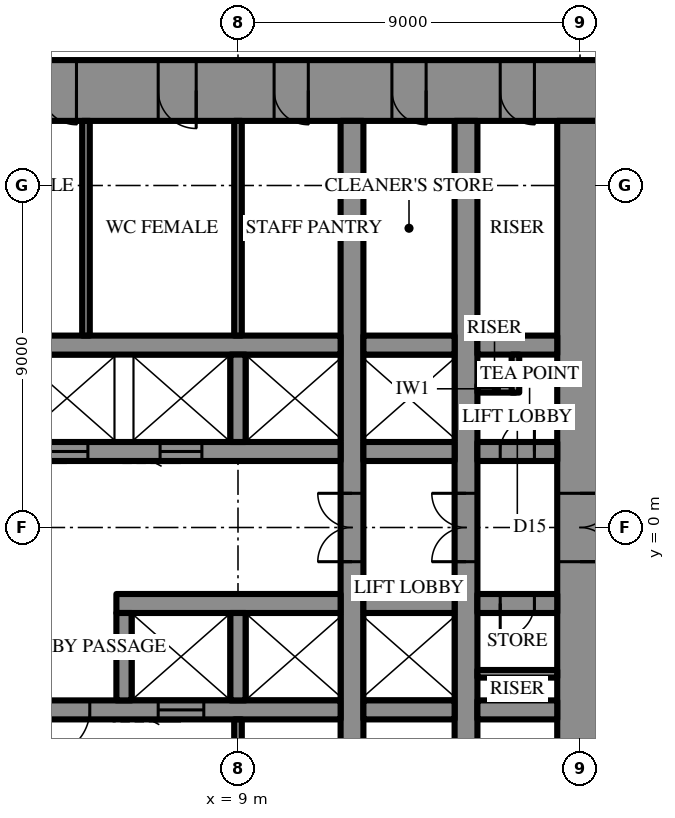
"""IFC4 building model, lengths in metres.
Left out: names, types, materials, properties, quantities, classifications, styles, units other than length and angle.
Written with IfcOpenShell. Run it as: python <this file> out.ifc"""

import sys

from ifc_helpers import new_model, si_unit, direction, frame, frame_2d, origin, place, context, subcontext, project, spatial, rectangle, extrude, element, fill, save


model = new_model("IFC4")
c1 = context("Model", 3, precision=1e-05, world=origin(), true_north=direction((0.0, 1.0)))
c2 = subcontext(c1, "Body", "Model", "MODEL_VIEW")
j1 = project(units=[si_unit("LENGTHUNIT", "METRE"), si_unit("PLANEANGLEUNIT", "RADIAN")], contexts=[c1])
p1 = place(None, origin())
s1 = spatial("IfcSite", under=j1, at=p1, CompositionType="ELEMENT")
p2 = place(p1, origin())
s2 = spatial("IfcBuilding", under=s1, at=p2, CompositionType="ELEMENT")
p3 = place(p2, frame((0.0, 0.0, 165.7)))
s3 = spatial("IfcBuildingStorey", under=s2, at=p3, CompositionType="ELEMENT", Elevation=165.7)
p4 = place(p3, frame((-18.6, 11.5, 0.0), z_axis=(0.0, 0.0, 1.0), x_axis=(1.0, 0.0, 0.0)))
e1 = element("IfcWall", 1, at=p4, inside=s3, PredefinedType="SHEAR", context=c2, shape_type="SweptSolid", body=[
    extrude(rectangle(XDim=37.2, YDim=1.6, at=frame_2d((18.6, 0.0))), origin(), (0.0, 0.0, 1.0), 4.2),
])
p5 = place(p4, frame((19.45, 0.0, 0.0)))
e2 = element("IfcOpeningElement", 2, at=p5, cuts=e1, PredefinedType="OPENING", context=c2, shape_type="SweptSolid", body=[
    extrude(rectangle(XDim=0.9, YDim=2.2, at=frame_2d((0.45, 1.1))), frame((0.0, 0.81, 0.0), z_axis=(0.0, -1.0, 0.0), x_axis=(1.0, 0.0, 0.0)), (0.0, 0.0, 1.0), 1.62),
])
p6 = place(p4, frame((22.45, 0.0, 0.0)))
e3 = element("IfcOpeningElement", 3, at=p6, cuts=e1, PredefinedType="OPENING", context=c2, shape_type="SweptSolid", body=[
    extrude(rectangle(XDim=0.9, YDim=2.2, at=frame_2d((0.45, 1.1))), frame((0.0, 0.81, 0.0), z_axis=(0.0, -1.0, 0.0), x_axis=(1.0, 0.0, 0.0)), (0.0, 0.0, 1.0), 1.62),
])
p7 = place(p4, frame((25.5, 0.0, 0.0)))
e4 = element("IfcOpeningElement", 4, at=p7, cuts=e1, PredefinedType="OPENING", context=c2, shape_type="SweptSolid", body=[
    extrude(rectangle(XDim=1.0, YDim=2.2, at=frame_2d((0.5, 1.1))), frame((0.0, 0.81, 0.0), z_axis=(0.0, -1.0, 0.0), x_axis=(1.0, 0.0, 0.0)), (0.0, 0.0, 1.0), 1.62),
])
p8 = place(p4, frame((1.8, 0.0, 0.0)))
e5 = element("IfcOpeningElement", 5, at=p8, cuts=e1, PredefinedType="OPENING", context=c2, shape_type="SweptSolid", body=[
    extrude(rectangle(XDim=0.9, YDim=2.2, at=frame_2d((0.45, 1.1))), frame((0.0, 0.81, 0.0), z_axis=(0.0, -1.0, 0.0), x_axis=(1.0, 0.0, 0.0)), (0.0, 0.0, 1.0), 1.62),
])
p9 = place(p4, frame((4.65, 0.0, 0.0)))
e6 = element("IfcOpeningElement", 6, at=p9, cuts=e1, PredefinedType="OPENING", context=c2, shape_type="SweptSolid", body=[
    extrude(rectangle(XDim=0.9, YDim=2.2, at=frame_2d((0.45, 1.1))), frame((0.0, 0.81, 0.0), z_axis=(0.0, -1.0, 0.0), x_axis=(1.0, 0.0, 0.0)), (0.0, 0.0, 1.0), 1.62),
])
p10 = place(p4, frame((7.75, 0.0, 0.0)))
e7 = element("IfcOpeningElement", 7, at=p10, cuts=e1, PredefinedType="OPENING", context=c2, shape_type="SweptSolid", body=[
    extrude(rectangle(XDim=0.9, YDim=2.2, at=frame_2d((0.45, 1.1))), frame((0.0, 0.81, 0.0), z_axis=(0.0, -1.0, 0.0), x_axis=(1.0, 0.0, 0.0)), (0.0, 0.0, 1.0), 1.62),
])
p11 = place(p4, frame((28.55, 0.0, 0.0)))
e8 = element("IfcOpeningElement", 8, at=p11, cuts=e1, PredefinedType="OPENING", context=c2, shape_type="SweptSolid", body=[
    extrude(rectangle(XDim=0.9, YDim=2.2, at=frame_2d((0.45, 1.1))), frame((0.0, 0.81, 0.0), z_axis=(0.0, -1.0, 0.0), x_axis=(1.0, 0.0, 0.0)), (0.0, 0.0, 1.0), 1.62),
])
p12 = place(p4, frame((31.65, 0.0, 0.0)))
e9 = element("IfcOpeningElement", 9, at=p12, cuts=e1, PredefinedType="OPENING", context=c2, shape_type="SweptSolid", body=[
    extrude(rectangle(XDim=0.9, YDim=2.2, at=frame_2d((0.45, 1.1))), frame((0.0, 0.81, 0.0), z_axis=(0.0, -1.0, 0.0), x_axis=(1.0, 0.0, 0.0)), (0.0, 0.0, 1.0), 1.62),
])
p13 = place(p4, frame((34.5, 0.0, 0.0)))
e10 = element("IfcOpeningElement", 10, at=p13, cuts=e1, PredefinedType="OPENING", context=c2, shape_type="SweptSolid", body=[
    extrude(rectangle(XDim=0.9, YDim=2.2, at=frame_2d((0.45, 1.1))), frame((0.0, 0.81, 0.0), z_axis=(0.0, -1.0, 0.0), x_axis=(1.0, 0.0, 0.0)), (0.0, 0.0, 1.0), 1.62),
])
p14 = place(p3, frame((18.0, -10.7, 0.0), z_axis=(0.0, 0.0, 1.0), x_axis=(0.0, 1.0, 0.0)))
e11 = element("IfcWall", 11, at=p14, inside=s3, PredefinedType="SHEAR", context=c2, shape_type="SweptSolid", body=[
    extrude(rectangle(XDim=21.4, YDim=1.2, at=frame_2d((10.7, 0.0))), origin(), (0.0, 0.0, 1.0), 4.2),
])
p15 = place(p14, frame((9.8, 0.0, 0.0)))
e12 = element("IfcOpeningElement", 12, at=p15, cuts=e11, PredefinedType="OPENING", context=c2, shape_type="SweptSolid", body=[
    extrude(rectangle(XDim=1.8, YDim=2.4, at=frame_2d((0.9, 1.2))), frame((0.0, 0.61, 0.0), z_axis=(0.0, -1.0, 0.0), x_axis=(1.0, 0.0, 0.0)), (0.0, 0.0, 1.0), 1.22),
])
p16 = place(p3, frame((12.0, -10.7, 0.0), z_axis=(0.0, 0.0, 1.0), x_axis=(0.0, 1.0, 0.0)))
e13 = element("IfcWall", 13, at=p16, inside=s3, PredefinedType="SHEAR", context=c2, shape_type="SweptSolid", body=[
    extrude(rectangle(XDim=21.4, YDim=0.6, at=frame_2d((10.7, 0.0))), origin(), (0.0, 0.0, 1.0), 4.2),
])
p17 = place(p16, frame((9.8, 0.0, 0.0)))
e14 = element("IfcOpeningElement", 14, at=p17, cuts=e13, PredefinedType="OPENING", context=c2, shape_type="SweptSolid", body=[
    extrude(rectangle(XDim=1.8, YDim=2.4, at=frame_2d((0.9, 1.2))), frame((0.0, 0.31, 0.0), z_axis=(0.0, -1.0, 0.0), x_axis=(1.0, 0.0, 0.0)), (0.0, 0.0, 1.0), 0.62),
])
p18 = place(p3, frame((15.0, -10.7, 0.0), z_axis=(0.0, 0.0, 1.0), x_axis=(0.0, 1.0, 0.0)))
e15 = element("IfcWall", 15, at=p18, inside=s3, PredefinedType="SHEAR", context=c2, shape_type="SweptSolid", body=[
    extrude(rectangle(XDim=21.4, YDim=0.6, at=frame_2d((10.7, 0.0))), origin(), (0.0, 0.0, 1.0), 4.2),
])
p19 = place(p18, frame((9.8, 0.0, 0.0)))
e16 = element("IfcOpeningElement", 16, at=p19, cuts=e15, PredefinedType="OPENING", context=c2, shape_type="SweptSolid", body=[
    extrude(rectangle(XDim=1.8, YDim=2.4, at=frame_2d((0.9, 1.2))), frame((0.0, 0.31, 0.0), z_axis=(0.0, -1.0, 0.0), x_axis=(1.0, 0.0, 0.0)), (0.0, 0.0, 1.0), 0.62),
])
p20 = place(p3, frame((-3.2, 2.0, 0.0), z_axis=(0.0, 0.0, 1.0), x_axis=(1.0, 0.0, 0.0)))
e17 = element("IfcWall", 17, at=p20, inside=s3, PredefinedType="SHEAR", context=c2, shape_type="SweptSolid", body=[
    extrude(rectangle(XDim=14.9, YDim=0.5, at=frame_2d((7.45, 0.0))), origin(), (0.0, 0.0, 1.0), 4.2),
])
p21 = place(p20, frame((1.15, 0.0, 0.0)))
e18 = element("IfcOpeningElement", 18, at=p21, cuts=e17, PredefinedType="OPENING", context=c2, shape_type="SweptSolid", body=[
    extrude(rectangle(XDim=1.1, YDim=2.2, at=frame_2d((0.55, 1.1))), frame((0.0, 0.26, 0.0), z_axis=(0.0, -1.0, 0.0), x_axis=(1.0, 0.0, 0.0)), (0.0, 0.0, 1.0), 0.52),
])
p22 = place(p20, frame((4.15, 0.0, 0.0)))
e19 = element("IfcOpeningElement", 19, at=p22, cuts=e17, PredefinedType="OPENING", context=c2, shape_type="SweptSolid", body=[
    extrude(rectangle(XDim=1.1, YDim=2.2, at=frame_2d((0.55, 1.1))), frame((0.0, 0.26, 0.0), z_axis=(0.0, -1.0, 0.0), x_axis=(1.0, 0.0, 0.0)), (0.0, 0.0, 1.0), 0.52),
])
p23 = place(p20, frame((7.15, 0.0, 0.0)))
e20 = element("IfcOpeningElement", 20, at=p23, cuts=e17, PredefinedType="OPENING", context=c2, shape_type="SweptSolid", body=[
    extrude(rectangle(XDim=1.1, YDim=2.2, at=frame_2d((0.55, 1.1))), frame((0.0, 0.26, 0.0), z_axis=(0.0, -1.0, 0.0), x_axis=(1.0, 0.0, 0.0)), (0.0, 0.0, 1.0), 0.52),
])
p24 = place(p20, frame((10.15, 0.0, 0.0)))
e21 = element("IfcOpeningElement", 21, at=p24, cuts=e17, PredefinedType="OPENING", context=c2, shape_type="SweptSolid", body=[
    extrude(rectangle(XDim=1.1, YDim=2.2, at=frame_2d((0.55, 1.1))), frame((0.0, 0.26, 0.0), z_axis=(0.0, -1.0, 0.0), x_axis=(1.0, 0.0, 0.0)), (0.0, 0.0, 1.0), 0.52),
])
p25 = place(p3, frame((12.3, 2.0, 0.0), z_axis=(0.0, 0.0, 1.0), x_axis=(1.0, 0.0, 0.0)))
e22 = element("IfcWall", 22, at=p25, inside=s3, PredefinedType="SHEAR", context=c2, shape_type="SweptSolid", body=[
    extrude(rectangle(XDim=2.4, YDim=0.5, at=frame_2d((1.2, 0.0))), origin(), (0.0, 0.0, 1.0), 4.2),
])
p26 = place(p3, frame((15.3, 2.0, 0.0), z_axis=(0.0, 0.0, 1.0), x_axis=(1.0, 0.0, 0.0)))
e23 = element("IfcWall", 23, at=p26, inside=s3, PredefinedType="SHEAR", context=c2, shape_type="SweptSolid", body=[
    extrude(rectangle(XDim=2.1, YDim=0.5, at=frame_2d((1.05, 0.0))), origin(), (0.0, 0.0, 1.0), 4.2),
])
p27 = place(p26, frame((0.6, 0.0, 0.0)))
e24 = element("IfcOpeningElement", 24, at=p27, cuts=e23, PredefinedType="OPENING", context=c2, shape_type="SweptSolid", body=[
    extrude(rectangle(XDim=0.9, YDim=2.2, at=frame_2d((0.45, 1.1))), frame((0.0, 0.26, 0.0), z_axis=(0.0, -1.0, 0.0), x_axis=(1.0, 0.0, 0.0)), (0.0, 0.0, 1.0), 0.52),
])
p28 = place(p3, frame((-11.7, 4.8, 0.0), z_axis=(0.0, 0.0, 1.0), x_axis=(1.0, 0.0, 0.0)))
e25 = element("IfcWall", 25, at=p28, inside=s3, PredefinedType="SHEAR", context=c2, shape_type="SweptSolid", body=[
    extrude(rectangle(XDim=23.4, YDim=0.5, at=frame_2d((11.7, 0.0))), origin(), (0.0, 0.0, 1.0), 4.2),
])
p29 = place(p28, frame((6.6, 0.0, 0.0)))
e26 = element("IfcOpeningElement", 26, at=p29, cuts=e25, PredefinedType="OPENING", context=c2, shape_type="SweptSolid", body=[
    extrude(rectangle(XDim=1.2, YDim=2.2, at=frame_2d((0.6, 1.1))), frame((0.0, 0.26, 0.0), z_axis=(0.0, -1.0, 0.0), x_axis=(1.0, 0.0, 0.0)), (0.0, 0.0, 1.0), 0.52),
])
p30 = place(p28, frame((3.6, 0.0, 0.0)))
e27 = element("IfcOpeningElement", 27, at=p30, cuts=e25, PredefinedType="OPENING", context=c2, shape_type="SweptSolid", body=[
    extrude(rectangle(XDim=1.2, YDim=2.2, at=frame_2d((0.6, 1.1))), frame((0.0, 0.26, 0.0), z_axis=(0.0, -1.0, 0.0), x_axis=(1.0, 0.0, 0.0)), (0.0, 0.0, 1.0), 0.52),
])
p31 = place(p3, frame((12.3, 4.8, 0.0), z_axis=(0.0, 0.0, 1.0), x_axis=(1.0, 0.0, 0.0)))
e28 = element("IfcWall", 28, at=p31, inside=s3, PredefinedType="SHEAR", context=c2, shape_type="SweptSolid", body=[
    extrude(rectangle(XDim=2.4, YDim=0.5, at=frame_2d((1.2, 0.0))), origin(), (0.0, 0.0, 1.0), 4.2),
])
p32 = place(p3, frame((15.3, 4.8, 0.0), z_axis=(0.0, 0.0, 1.0), x_axis=(1.0, 0.0, 0.0)))
e29 = element("IfcWall", 29, at=p32, inside=s3, PredefinedType="SHEAR", context=c2, shape_type="SweptSolid", body=[
    extrude(rectangle(XDim=2.1, YDim=0.5, at=frame_2d((1.05, 0.0))), origin(), (0.0, 0.0, 1.0), 4.2),
])
p33 = place(p3, frame((9.0, 2.25, 0.0), z_axis=(0.0, 0.0, 1.0), x_axis=(0.0, 1.0, 0.0)))
e30 = element("IfcWall", 30, at=p33, inside=s3, PredefinedType="SHEAR", context=c2, shape_type="SweptSolid", body=[
    extrude(rectangle(XDim=2.3, YDim=0.4, at=frame_2d((1.15, 0.0))), origin(), (0.0, 0.0, 1.0), 4.2),
])
p34 = place(p3, frame((17.4, -2.0, 0.0), z_axis=(0.0, 0.0, 1.0), x_axis=(-1.0, 0.0, 0.0)))
e31 = element("IfcWall", 31, at=p34, inside=s3, PredefinedType="SHEAR", context=c2, shape_type="SweptSolid", body=[
    extrude(rectangle(XDim=2.1, YDim=0.5, at=frame_2d((1.05, 0.0))), origin(), (0.0, 0.0, 1.0), 4.2),
])
p35 = place(p34, frame((0.6, 0.0, 0.0)))
e32 = element("IfcOpeningElement", 32, at=p35, cuts=e31, PredefinedType="OPENING", context=c2, shape_type="SweptSolid", body=[
    extrude(rectangle(XDim=0.9, YDim=2.2, at=frame_2d((0.45, 1.1))), frame((0.0, 0.26, 0.0), z_axis=(0.0, -1.0, 0.0), x_axis=(1.0, 0.0, 0.0)), (0.0, 0.0, 1.0), 0.52),
])
p36 = place(p3, frame((14.7, -2.0, 0.0), z_axis=(0.0, 0.0, 1.0), x_axis=(-1.0, 0.0, 0.0)))
e33 = element("IfcWall", 33, at=p36, inside=s3, PredefinedType="SHEAR", context=c2, shape_type="SweptSolid", body=[
    extrude(rectangle(XDim=2.4, YDim=0.5, at=frame_2d((1.2, 0.0))), origin(), (0.0, 0.0, 1.0), 4.2),
])
p37 = place(p3, frame((11.7, -2.0, 0.0), z_axis=(0.0, 0.0, 1.0), x_axis=(-1.0, 0.0, 0.0)))
e34 = element("IfcWall", 34, at=p37, inside=s3, PredefinedType="SHEAR", context=c2, shape_type="SweptSolid", body=[
    extrude(rectangle(XDim=5.9, YDim=0.5, at=frame_2d((2.95, 0.0))), origin(), (0.0, 0.0, 1.0), 4.2),
])
p38 = place(p3, frame((17.4, -4.8, 0.0), z_axis=(0.0, 0.0, 1.0), x_axis=(-1.0, 0.0, 0.0)))
e35 = element("IfcWall", 35, at=p38, inside=s3, PredefinedType="SHEAR", context=c2, shape_type="SweptSolid", body=[
    extrude(rectangle(XDim=2.1, YDim=0.5, at=frame_2d((1.05, 0.0))), origin(), (0.0, 0.0, 1.0), 4.2),
])
p39 = place(p3, frame((14.7, -4.8, 0.0), z_axis=(0.0, 0.0, 1.0), x_axis=(-1.0, 0.0, 0.0)))
e36 = element("IfcWall", 36, at=p39, inside=s3, PredefinedType="SHEAR", context=c2, shape_type="SweptSolid", body=[
    extrude(rectangle(XDim=2.4, YDim=0.5, at=frame_2d((1.2, 0.0))), origin(), (0.0, 0.0, 1.0), 4.2),
])
p40 = place(p3, frame((11.7, -4.8, 0.0), z_axis=(0.0, 0.0, 1.0), x_axis=(-1.0, 0.0, 0.0)))
e37 = element("IfcWall", 37, at=p40, inside=s3, PredefinedType="SHEAR", context=c2, shape_type="SweptSolid", body=[
    extrude(rectangle(XDim=23.4, YDim=0.5, at=frame_2d((11.7, 0.0))), origin(), (0.0, 0.0, 1.0), 4.2),
])
p41 = place(p40, frame((6.6, 0.0, 0.0)))
e38 = element("IfcOpeningElement", 38, at=p41, cuts=e37, PredefinedType="OPENING", context=c2, shape_type="SweptSolid", body=[
    extrude(rectangle(XDim=1.2, YDim=2.2, at=frame_2d((0.6, 1.1))), frame((0.0, 0.26, 0.0), z_axis=(0.0, -1.0, 0.0), x_axis=(1.0, 0.0, 0.0)), (0.0, 0.0, 1.0), 0.52),
])
p42 = place(p40, frame((3.6, 0.0, 0.0)))
e39 = element("IfcOpeningElement", 39, at=p42, cuts=e37, PredefinedType="OPENING", context=c2, shape_type="SweptSolid", body=[
    extrude(rectangle(XDim=1.2, YDim=2.2, at=frame_2d((0.6, 1.1))), frame((0.0, 0.26, 0.0), z_axis=(0.0, -1.0, 0.0), x_axis=(1.0, 0.0, 0.0)), (0.0, 0.0, 1.0), 0.52),
])
for number, where, z_axis, x_axis in (
    (40, (9.0, -2.25, 0.0), (0.0, 0.0, 1.0), (0.0, -1.0, 0.0)),
    (41, (6.0, -2.25, 0.0), (0.0, 0.0, 1.0), (0.0, -1.0, 0.0)),
):
    element("IfcWall", number, at=place(p3, frame(where, z_axis=z_axis, x_axis=x_axis)), inside=s3, PredefinedType="SHEAR", context=c2, shape_type="SweptSolid", body=[
        extrude(rectangle(XDim=2.3, YDim=0.4, at=frame_2d((1.15, 0.0))), origin(), (0.0, 0.0, 1.0), 4.2),
    ])
for number, where, z_axis, x_axis in (
    (42, (9.0, 5.05, 0.0), (0.0, 0.0, 1.0), (0.0, 1.0, 0.0)),
    (43, (5.0, 5.05, 0.0), (0.0, 0.0, 1.0), (0.0, 1.0, 0.0)),
    (44, (9.0, -5.05, 0.0), (0.0, 0.0, 1.0), (0.0, -1.0, 0.0)),
):
    element("IfcWall", number, at=place(p3, frame(where, z_axis=z_axis, x_axis=x_axis)), inside=s3, PredefinedType="PARTITIONING", context=c2, shape_type="SweptSolid", body=[
        extrude(rectangle(XDim=5.65, YDim=0.2, at=frame_2d((2.825, 0.0))), origin(), (0.0, 0.0, 1.0), 4.0),
    ])
for number, where, z_axis, x_axis in (
    (45, (15.3, 3.65, 0.0), (0.0, 0.0, 1.0), (1.0, 0.0, 0.0)),
    (46, (16.3, 3.55, 0.0), (0.0, 0.0, 1.0), (0.0, 1.0, 0.0)),
):
    element("IfcWall", number, at=place(p3, frame(where, z_axis=z_axis, x_axis=x_axis)), inside=s3, PredefinedType="PARTITIONING", context=c2, shape_type="SweptSolid", body=[
        extrude(rectangle(XDim=1.0, YDim=0.2, at=frame_2d((0.5, 0.0))), origin(), (0.0, 0.0, 1.0), 4.0),
    ])
p43 = place(p3, frame((17.4, -3.85, 0.0), z_axis=(0.0, 0.0, 1.0), x_axis=(-1.0, 0.0, 0.0)))
e47 = element("IfcWall", 47, at=p43, inside=s3, PredefinedType="PARTITIONING", context=c2, shape_type="SweptSolid", body=[
    extrude(rectangle(XDim=2.1, YDim=0.2, at=frame_2d((1.05, 0.0))), origin(), (0.0, 0.0, 1.0), 4.0),
])
p44 = place(p15, frame((1.8, 0.0, 0.0), z_axis=(0.0, 0.0, 1.0), x_axis=(-1.0, 0.0, 0.0)))
e48 = element("IfcDoor", 48, at=p44, inside=s3, OperationType="DOUBLE_DOOR_SINGLE_SWING", PredefinedType="DOOR", context=c2, shape_type="SweptSolid", body=[
    extrude(rectangle(XDim=1.8, YDim=2.4, at=frame_2d((0.9, 1.2))), frame((0.0, 0.025, 0.0), z_axis=(0.0, -1.0, 0.0), x_axis=(1.0, 0.0, 0.0)), (0.0, 0.0, 1.0), 0.05),
])
fill(e12, e48)
p45 = place(p6, frame((0.9, 0.0, 0.0), z_axis=(0.0, 0.0, 1.0), x_axis=(-1.0, 0.0, 0.0)))
e49 = element("IfcDoor", 49, at=p45, inside=s3, OperationType="SINGLE_SWING_RIGHT", PredefinedType="DOOR", context=c2, shape_type="SweptSolid", body=[
    extrude(rectangle(XDim=0.9, YDim=2.2, at=frame_2d((0.45, 1.1))), frame((0.0, 0.025, 0.0), z_axis=(0.0, -1.0, 0.0), x_axis=(1.0, 0.0, 0.0)), (0.0, 0.0, 1.0), 0.05),
])
fill(e3, e49)
p46 = place(p7, frame((1.0, 0.0, 0.0), z_axis=(0.0, 0.0, 1.0), x_axis=(-1.0, 0.0, 0.0)))
e50 = element("IfcDoor", 50, at=p46, inside=s3, OperationType="SINGLE_SWING_RIGHT", PredefinedType="DOOR", context=c2, shape_type="SweptSolid", body=[
    extrude(rectangle(XDim=1.0, YDim=2.2, at=frame_2d((0.5, 1.1))), frame((0.0, 0.025, 0.0), z_axis=(0.0, -1.0, 0.0), x_axis=(1.0, 0.0, 0.0)), (0.0, 0.0, 1.0), 0.05),
])
fill(e4, e50)
p47 = place(p11, frame((0.9, 0.0, 0.0), z_axis=(0.0, 0.0, 1.0), x_axis=(-1.0, 0.0, 0.0)))
e51 = element("IfcDoor", 51, at=p47, inside=s3, OperationType="SINGLE_SWING_RIGHT", PredefinedType="DOOR", context=c2, shape_type="SweptSolid", body=[
    extrude(rectangle(XDim=0.9, YDim=2.2, at=frame_2d((0.45, 1.1))), frame((0.0, 0.025, 0.0), z_axis=(0.0, -1.0, 0.0), x_axis=(1.0, 0.0, 0.0)), (0.0, 0.0, 1.0), 0.05),
])
fill(e8, e51)
p48 = place(p12, frame((0.9, 0.0, 0.0), z_axis=(0.0, 0.0, 1.0), x_axis=(-1.0, 0.0, 0.0)))
e52 = element("IfcDoor", 52, at=p48, inside=s3, OperationType="SINGLE_SWING_RIGHT", PredefinedType="DOOR", context=c2, shape_type="SweptSolid", body=[
    extrude(rectangle(XDim=0.9, YDim=2.2, at=frame_2d((0.45, 1.1))), frame((0.0, 0.025, 0.0), z_axis=(0.0, -1.0, 0.0), x_axis=(1.0, 0.0, 0.0)), (0.0, 0.0, 1.0), 0.05),
])
fill(e9, e52)
p49 = place(p13, frame((0.9, 0.0, 0.0), z_axis=(0.0, 0.0, 1.0), x_axis=(-1.0, 0.0, 0.0)))
e53 = element("IfcDoor", 53, at=p49, inside=s3, OperationType="SINGLE_SWING_RIGHT", PredefinedType="DOOR", context=c2, shape_type="SweptSolid", body=[
    extrude(rectangle(XDim=0.9, YDim=2.2, at=frame_2d((0.45, 1.1))), frame((0.0, 0.025, 0.0), z_axis=(0.0, -1.0, 0.0), x_axis=(1.0, 0.0, 0.0)), (0.0, 0.0, 1.0), 0.05),
])
fill(e10, e53)
p50 = place(p41, origin())
e54 = element("IfcDoor", 54, at=p50, inside=s3, OperationType="SINGLE_SWING_LEFT", PredefinedType="DOOR", context=c2, shape_type="SweptSolid", body=[
    extrude(rectangle(XDim=1.2, YDim=2.2, at=frame_2d((0.6, 1.1))), frame((0.0, 0.025, 0.0), z_axis=(0.0, -1.0, 0.0), x_axis=(1.0, 0.0, 0.0)), (0.0, 0.0, 1.0), 0.05),
])
fill(e38, e54)
p51 = place(p27, origin())
e55 = element("IfcDoor", 55, at=p51, inside=s3, OperationType="SINGLE_SWING_LEFT", PredefinedType="DOOR", context=c2, shape_type="SweptSolid", body=[
    extrude(rectangle(XDim=0.9, YDim=2.2, at=frame_2d((0.45, 1.1))), frame((0.0, 0.025, 0.0), z_axis=(0.0, -1.0, 0.0), x_axis=(1.0, 0.0, 0.0)), (0.0, 0.0, 1.0), 0.05),
])
fill(e24, e55)
p52 = place(p35, origin())
e56 = element("IfcDoor", 56, at=p52, inside=s3, OperationType="SINGLE_SWING_LEFT", PredefinedType="DOOR", context=c2, shape_type="SweptSolid", body=[
    extrude(rectangle(XDim=0.9, YDim=2.2, at=frame_2d((0.45, 1.1))), frame((0.0, 0.025, 0.0), z_axis=(0.0, -1.0, 0.0), x_axis=(1.0, 0.0, 0.0)), (0.0, 0.0, 1.0), 0.05),
])
fill(e32, e56)
p53 = place(p17, origin())
e57 = element("IfcDoor", 57, at=p53, inside=s3, OperationType="DOUBLE_DOOR_SINGLE_SWING", PredefinedType="DOOR", context=c2, shape_type="SweptSolid", body=[
    extrude(rectangle(XDim=1.8, YDim=2.4, at=frame_2d((0.9, 1.2))), frame((0.0, 0.025, 0.0), z_axis=(0.0, -1.0, 0.0), x_axis=(1.0, 0.0, 0.0)), (0.0, 0.0, 1.0), 0.05),
])
fill(e14, e57)
p54 = place(p19, origin())
e58 = element("IfcDoor", 58, at=p54, inside=s3, OperationType="DOUBLE_DOOR_SINGLE_SWING", PredefinedType="DOOR", context=c2, shape_type="SweptSolid", body=[
    extrude(rectangle(XDim=1.8, YDim=2.4, at=frame_2d((0.9, 1.2))), frame((0.0, 0.025, 0.0), z_axis=(0.0, -1.0, 0.0), x_axis=(1.0, 0.0, 0.0)), (0.0, 0.0, 1.0), 0.05),
])
fill(e16, e58)
p55 = place(p23, frame((1.1, 0.0, 0.0), z_axis=(0.0, 0.0, 1.0), x_axis=(-1.0, 0.0, 0.0)))
e59 = element("IfcDoor", 59, at=p55, inside=s3, OperationType="SLIDING_TO_LEFT", PredefinedType="DOOR", context=c2, shape_type="SweptSolid", body=[
    extrude(rectangle(XDim=1.1, YDim=2.2, at=frame_2d((0.55, 1.1))), frame((0.0, 0.025, 0.0), z_axis=(0.0, -1.0, 0.0), x_axis=(1.0, 0.0, 0.0)), (0.0, 0.0, 1.0), 0.05),
])
fill(e20, e59)
p56 = place(p24, frame((1.1, 0.0, 0.0), z_axis=(0.0, 0.0, 1.0), x_axis=(-1.0, 0.0, 0.0)))
e60 = element("IfcDoor", 60, at=p56, inside=s3, OperationType="SLIDING_TO_LEFT", PredefinedType="DOOR", context=c2, shape_type="SweptSolid", body=[
    extrude(rectangle(XDim=1.1, YDim=2.2, at=frame_2d((0.55, 1.1))), frame((0.0, 0.025, 0.0), z_axis=(0.0, -1.0, 0.0), x_axis=(1.0, 0.0, 0.0)), (0.0, 0.0, 1.0), 0.05),
])
fill(e21, e60)
p57 = place(p42, origin())
e61 = element("IfcDoor", 61, at=p57, inside=s3, OperationType="SLIDING_TO_LEFT", PredefinedType="DOOR", context=c2, shape_type="SweptSolid", body=[
    extrude(rectangle(XDim=1.2, YDim=2.2, at=frame_2d((0.6, 1.1))), frame((0.0, 0.025, 0.0), z_axis=(0.0, -1.0, 0.0), x_axis=(1.0, 0.0, 0.0)), (0.0, 0.0, 1.0), 0.05),
])
fill(e39, e61)
save(model, sys.argv[1])
